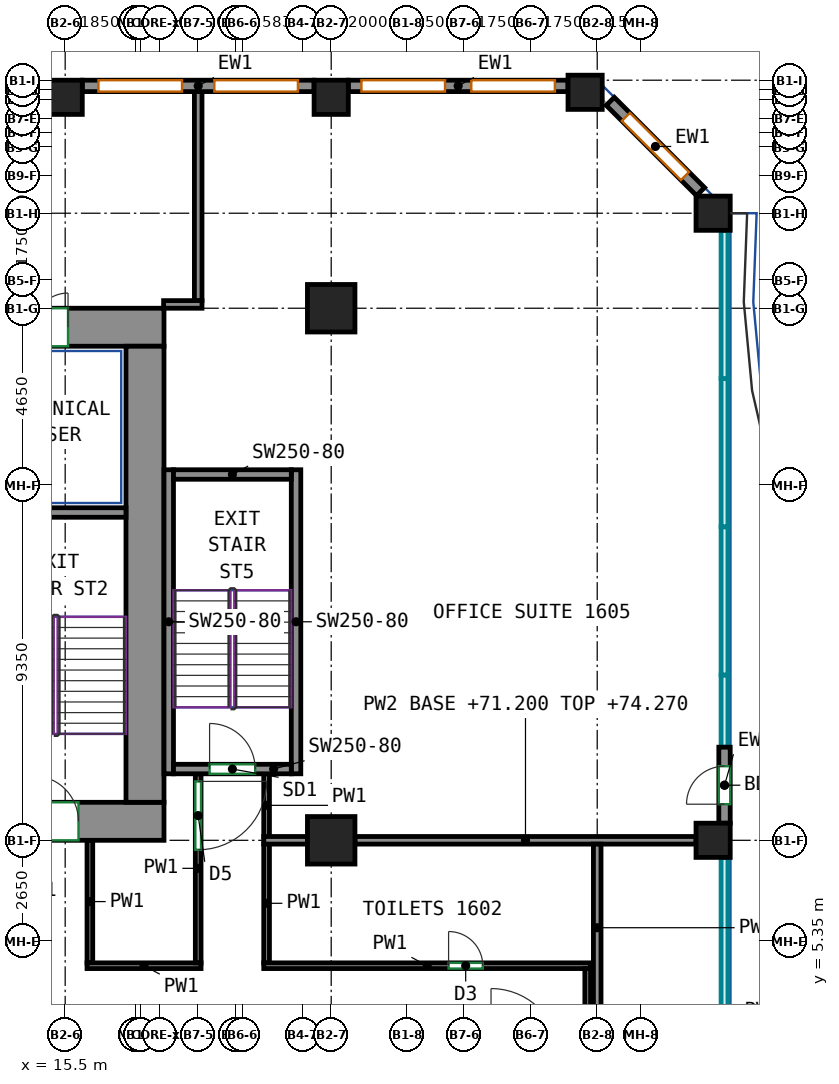
"""IFC4 building model, lengths in metres.
Left out: names, types, materials, properties, quantities, classifications, styles, units other than length and angle.
Written with IfcOpenShell. Run it as: python <this file> out.ifc"""

import sys

from ifc_helpers import new_model, si_unit, direction, frame, frame_2d, origin, origin_2d, place, context, subcontext, project, spatial, rectangle, extrude, source, transform, mapped, element, fill, save


model = new_model("IFC4")
c1 = context("Model", 3, precision=1e-05, world=origin(), true_north=direction((0.0, 1.0)))
c2 = subcontext(c1, "Body", "Model", "MODEL_VIEW")
j1 = project(units=[si_unit("LENGTHUNIT", "METRE"), si_unit("PLANEANGLEUNIT", "RADIAN")], contexts=[c1])
p1 = place(None, origin())
s1 = spatial("IfcSite", under=j1, at=p1, CompositionType="ELEMENT")
p2 = place(p1, origin())
s2 = spatial("IfcBuilding", under=s1, at=p2, CompositionType="ELEMENT")
p3 = place(p2, frame((0.0, 0.0, 71.2)))
s3 = spatial("IfcBuildingStorey", under=s2, at=p3, CompositionType="ELEMENT", Elevation=71.2)
m1 = source(origin(), c2, "Body", "SweptSolid", [
    extrude(rectangle(XDim=0.9, YDim=0.9, at=origin_2d()), origin(), (0.0, 0.0, 1.0), 3.72),
])
p4 = place(p3, frame((15.5, 27.55, 0.0), z_axis=(0.0, 0.0, 1.0), x_axis=(1.0, 0.0, 0.0)))
e1 = element("IfcColumn", 1, at=p4, inside=s3, PredefinedType="COLUMN", context=c2, shape_type="MappedRepresentation", body=[
    mapped(m1, transform((0.0, 0.0, 0.0))),
])
m2 = source(origin(), c2, "Body", "SweptSolid", [
    extrude(rectangle(XDim=1.25, YDim=1.25, at=origin_2d()), origin(), (0.0, 0.0, 1.0), 3.72),
])
for number, where, z_axis, x_axis in (
    (2, (22.5, 8.0, 0.0), (0.0, 0.0, 1.0), (1.0, 0.0, 0.0)),
    (3, (22.5, 22.0, 0.0), (0.0, 0.0, 1.0), (1.0, 0.0, 0.0)),
):
    element("IfcColumn", number, at=place(p3, frame(where, z_axis=z_axis, x_axis=x_axis)), inside=s3, PredefinedType="COLUMN", context=c2, shape_type="MappedRepresentation", body=[
        mapped(m2, transform((0.0, 0.0, 0.0))),
    ])
for number, where, z_axis, x_axis in (
    (4, (22.5, 27.55, 0.0), (0.0, 0.0, 1.0), (1.0, 0.0, 0.0)),
    (5, (29.182, 27.682, 0.0), (0.0, 0.0, 1.0), (1.0, 0.0, 0.0)),
    (6, (32.55, 8.0, 0.0), (0.0, 0.0, 1.0), (1.0, 0.0, 0.0)),
    (7, (32.55, 24.5, 0.0), (0.0, 0.0, 1.0), (1.0, 0.0, 0.0)),
):
    element("IfcColumn", number, at=place(p3, frame(where, z_axis=z_axis, x_axis=x_axis)), inside=s3, PredefinedType="COLUMN", context=c2, shape_type="MappedRepresentation", body=[
        mapped(m1, transform((0.0, 0.0, 0.0))),
    ])
m3 = source(origin(), c2, "Body", "SweptSolid", [
    extrude(rectangle(XDim=5.63, YDim=1.0, at=frame_2d((2.815, 0.0))), origin(), (0.0, 0.0, 1.0), 3.72),
])
p5 = place(p3, frame((12.47, 8.5, 0.0), z_axis=(0.0, 0.0, 1.0), x_axis=(1.0, 0.0, 0.0)))
e8 = element("IfcWall", 8, at=p5, inside=s3, PredefinedType="SHEAR", context=c2, shape_type="MappedRepresentation", body=[
    mapped(m3, transform((0.0, 0.0, 0.0))),
])
p6 = place(p5, frame((2.18, 0.0, 0.0)))
e9 = element("IfcOpeningElement", 9, at=p6, cuts=e8, PredefinedType="OPENING", context=c2, shape_type="SweptSolid", body=[
    extrude(rectangle(XDim=1.2, YDim=2.1, at=frame_2d((0.6, 1.05))), frame((0.0, 0.51, 0.0), z_axis=(0.0, -1.0, 0.0), x_axis=(1.0, 0.0, 0.0)), (0.0, 0.0, 1.0), 1.02),
])
m4 = source(origin(), c2, "Body", "SweptSolid", [
    extrude(rectangle(XDim=34.1, YDim=1.0, at=frame_2d((17.05, 0.0))), origin(), (0.0, 0.0, 1.0), 3.72),
])
p7 = place(p3, frame((-16.0, 21.5, 0.0), z_axis=(0.0, 0.0, 1.0), x_axis=(1.0, 0.0, 0.0)))
e10 = element("IfcWall", 10, at=p7, inside=s3, PredefinedType="SHEAR", context=c2, shape_type="MappedRepresentation", body=[
    mapped(m4, transform((0.0, 0.0, 0.0))),
])
p8 = place(p7, frame((6.831, 0.0, 0.0)))
e11 = element("IfcOpeningElement", 11, at=p8, cuts=e10, PredefinedType="OPENING", context=c2, shape_type="SweptSolid", body=[
    extrude(rectangle(XDim=0.9, YDim=2.1, at=frame_2d((0.45, 1.05))), frame((0.0, 0.51, 0.0), z_axis=(0.0, -1.0, 0.0), x_axis=(1.0, 0.0, 0.0)), (0.0, 0.0, 1.0), 1.02),
])
p9 = place(p7, frame((12.138, 0.0, 0.0)))
e12 = element("IfcOpeningElement", 12, at=p9, cuts=e10, PredefinedType="OPENING", context=c2, shape_type="SweptSolid", body=[
    extrude(rectangle(XDim=0.9, YDim=2.1, at=frame_2d((0.45, 1.05))), frame((0.0, 0.51, 0.0), z_axis=(0.0, -1.0, 0.0), x_axis=(1.0, 0.0, 0.0)), (0.0, 0.0, 1.0), 1.02),
])
p10 = place(p7, frame((17.565, 0.0, 0.0)))
e13 = element("IfcOpeningElement", 13, at=p10, cuts=e10, PredefinedType="OPENING", context=c2, shape_type="SweptSolid", body=[
    extrude(rectangle(XDim=0.9, YDim=2.1, at=frame_2d((0.45, 1.05))), frame((0.0, 0.51, 0.0), z_axis=(0.0, -1.0, 0.0), x_axis=(1.0, 0.0, 0.0)), (0.0, 0.0, 1.0), 1.02),
])
p11 = place(p7, frame((21.786, 0.0, 0.0)))
e14 = element("IfcOpeningElement", 14, at=p11, cuts=e10, PredefinedType="OPENING", context=c2, shape_type="SweptSolid", body=[
    extrude(rectangle(XDim=0.9, YDim=2.1, at=frame_2d((0.45, 1.05))), frame((0.0, 0.51, 0.0), z_axis=(0.0, -1.0, 0.0), x_axis=(1.0, 0.0, 0.0)), (0.0, 0.0, 1.0), 1.02),
])
p12 = place(p7, frame((26.127, 0.0, 0.0)))
e15 = element("IfcOpeningElement", 15, at=p12, cuts=e10, PredefinedType="OPENING", context=c2, shape_type="SweptSolid", body=[
    extrude(rectangle(XDim=0.9, YDim=2.1, at=frame_2d((0.45, 1.05))), frame((0.0, 0.51, 0.0), z_axis=(0.0, -1.0, 0.0), x_axis=(1.0, 0.0, 0.0)), (0.0, 0.0, 1.0), 1.02),
])
p13 = place(p7, frame((2.525, 0.0, 0.0)))
e16 = element("IfcOpeningElement", 16, at=p13, cuts=e10, PredefinedType="OPENING", context=c2, shape_type="SweptSolid", body=[
    extrude(rectangle(XDim=0.9, YDim=2.1, at=frame_2d((0.45, 1.05))), frame((0.0, 0.51, 0.0), z_axis=(0.0, -1.0, 0.0), x_axis=(1.0, 0.0, 0.0)), (0.0, 0.0, 1.0), 1.02),
])
p14 = place(p7, frame((30.675, 0.0, 0.0)))
e17 = element("IfcOpeningElement", 17, at=p14, cuts=e10, PredefinedType="OPENING", context=c2, shape_type="SweptSolid", body=[
    extrude(rectangle(XDim=0.9, YDim=2.1, at=frame_2d((0.45, 1.05))), frame((0.0, 0.51, 0.0), z_axis=(0.0, -1.0, 0.0), x_axis=(1.0, 0.0, 0.0)), (0.0, 0.0, 1.0), 1.02),
])
m5 = source(origin(), c2, "Body", "SweptSolid", [
    extrude(rectangle(XDim=12.0, YDim=1.0, at=frame_2d((6.0, 0.0))), origin(), (0.0, 0.0, 1.0), 3.72),
])
p15 = place(p3, frame((17.6, 9.0, 0.0), z_axis=(0.0, 0.0, 1.0), x_axis=(0.0, 1.0, 0.0)))
e18 = element("IfcWall", 18, at=p15, inside=s3, PredefinedType="SHEAR", context=c2, shape_type="MappedRepresentation", body=[
    mapped(m5, transform((0.0, 0.0, 0.0))),
])
m6 = source(origin(), c2, "Body", "SweptSolid", [
    extrude(rectangle(XDim=3.7, YDim=0.25, at=frame_2d((1.85, 0.0))), origin(), (0.0, 0.0, 1.0), 3.72),
])
p16 = place(p3, frame((13.4, 16.625, 0.0), z_axis=(0.0, 0.0, 1.0), x_axis=(1.0, 0.0, 0.0)))
e19 = element("IfcWall", 19, at=p16, inside=s3, PredefinedType="SHEAR", context=c2, shape_type="MappedRepresentation", body=[
    mapped(m6, transform((0.0, 0.0, 0.0))),
])
m7 = source(origin(), c2, "Body", "SweptSolid", [
    extrude(rectangle(XDim=8.0, YDim=0.25, at=frame_2d((4.0, 0.0))), origin(), (0.0, 0.0, 1.0), 3.72),
])
for number, where, z_axis, x_axis in (
    (20, (18.225, 9.75, 0.0), (0.0, 0.0, 1.0), (0.0, 1.0, 0.0)),
    (21, (21.575, 9.75, 0.0), (0.0, 0.0, 1.0), (0.0, 1.0, 0.0)),
):
    element("IfcWall", number, at=place(p3, frame(where, z_axis=z_axis, x_axis=x_axis)), inside=s3, PredefinedType="SHEAR", context=c2, shape_type="MappedRepresentation", body=[
        mapped(m7, transform((0.0, 0.0, 0.0))),
    ])
m8 = source(origin(), c2, "Body", "SweptSolid", [
    extrude(rectangle(XDim=3.1, YDim=0.25, at=frame_2d((1.55, 0.0))), origin(), (0.0, 0.0, 1.0), 3.72),
])
p17 = place(p3, frame((18.35, 9.875, 0.0), z_axis=(0.0, 0.0, 1.0), x_axis=(1.0, 0.0, 0.0)))
e22 = element("IfcWall", 22, at=p17, inside=s3, PredefinedType="SHEAR", context=c2, shape_type="MappedRepresentation", body=[
    mapped(m8, transform((0.0, 0.0, 0.0))),
])
p18 = place(p17, frame((0.95, 0.0, 0.0)))
e23 = element("IfcOpeningElement", 23, at=p18, cuts=e22, PredefinedType="OPENING", context=c2, shape_type="SweptSolid", body=[
    extrude(rectangle(XDim=1.2, YDim=2.1, at=frame_2d((0.6, 1.05))), frame((0.0, 0.135, 0.0), z_axis=(0.0, -1.0, 0.0), x_axis=(1.0, 0.0, 0.0)), (0.0, 0.0, 1.0), 0.27),
])
p19 = place(p3, frame((18.35, 17.625, 0.0), z_axis=(0.0, 0.0, 1.0), x_axis=(1.0, 0.0, 0.0)))
e24 = element("IfcWall", 24, at=p19, inside=s3, PredefinedType="SHEAR", context=c2, shape_type="MappedRepresentation", body=[
    mapped(m8, transform((0.0, 0.0, 0.0))),
])
m9 = source(origin(), c2, "Body", "SweptSolid", [
    extrude(rectangle(XDim=2.0, YDim=0.3, at=frame_2d((1.0, 0.0))), origin(), (0.0, 0.0, 1.0), 3.72),
])
p20 = place(p3, frame((32.85, 8.45, 0.0), z_axis=(0.0, 0.0, 1.0), x_axis=(0.0, 1.0, 0.0)))
e25 = element("IfcWall", 25, at=p20, inside=s3, PredefinedType="SOLIDWALL", context=c2, shape_type="MappedRepresentation", body=[
    mapped(m9, transform((0.0, 0.0, 0.0))),
])
p21 = place(p20, frame((0.5, 0.0, 0.0)))
e26 = element("IfcOpeningElement", 26, at=p21, cuts=e25, PredefinedType="OPENING", context=c2, shape_type="SweptSolid", body=[
    extrude(rectangle(XDim=1.0, YDim=2.1, at=frame_2d((0.5, 1.05))), frame((0.0, 0.16, 0.0), z_axis=(0.0, -1.0, 0.0), x_axis=(1.0, 0.0, 0.0)), (0.0, 0.0, 1.0), 0.32),
])
m10 = source(origin(), c2, "Body", "SweptSolid", [
    extrude(rectangle(XDim=3.359, YDim=0.3, at=frame_2d((1.679, 0.0))), origin(), (0.0, 0.0, 1.0), 3.72),
])
p22 = place(p3, frame((32.219, 25.069, 0.0), z_axis=(0.0, 0.0, 1.0), x_axis=(-0.707070438228, 0.707143122278, 0.0)))
e27 = element("IfcWall", 27, at=p22, inside=s3, PredefinedType="SOLIDWALL", context=c2, shape_type="MappedRepresentation", body=[
    mapped(m10, transform((0.0, 0.0, 0.0))),
])
p23 = place(p22, frame((0.579, 0.0, 0.7)))
e28 = element("IfcOpeningElement", 28, at=p23, cuts=e27, PredefinedType="OPENING", context=c2, shape_type="SweptSolid", body=[
    extrude(rectangle(XDim=2.2, YDim=2.25, at=frame_2d((1.1, 1.125))), frame((0.0, 0.16, 0.0), z_axis=(0.0, -1.0, 0.0), x_axis=(1.0, 0.0, 0.0)), (0.0, 0.0, 1.0), 0.32),
])
m11 = source(origin(), c2, "Body", "SweptSolid", [
    extrude(rectangle(XDim=5.782, YDim=0.3, at=frame_2d((2.891, 0.0))), origin(), (0.0, 0.0, 1.0), 3.72),
])
p24 = place(p3, frame((28.732, 27.85, 0.0), z_axis=(0.0, 0.0, 1.0), x_axis=(-1.0, 0.0, 0.0)))
e29 = element("IfcWall", 29, at=p24, inside=s3, PredefinedType="SOLIDWALL", context=c2, shape_type="MappedRepresentation", body=[
    mapped(m11, transform((0.0, 0.0, 0.0))),
])
p25 = place(p24, frame((0.345, 0.0, 0.7)))
e30 = element("IfcOpeningElement", 30, at=p25, cuts=e29, PredefinedType="OPENING", context=c2, shape_type="SweptSolid", body=[
    extrude(rectangle(XDim=2.2, YDim=2.25, at=frame_2d((1.1, 1.125))), frame((0.0, 0.16, 0.0), z_axis=(0.0, -1.0, 0.0), x_axis=(1.0, 0.0, 0.0)), (0.0, 0.0, 1.0), 0.32),
])
p26 = place(p24, frame((3.236, 0.0, 0.7)))
e31 = element("IfcOpeningElement", 31, at=p26, cuts=e29, PredefinedType="OPENING", context=c2, shape_type="SweptSolid", body=[
    extrude(rectangle(XDim=2.2, YDim=2.25, at=frame_2d((1.1, 1.125))), frame((0.0, 0.16, 0.0), z_axis=(0.0, -1.0, 0.0), x_axis=(1.0, 0.0, 0.0)), (0.0, 0.0, 1.0), 0.32),
])
m12 = source(origin(), c2, "Body", "SweptSolid", [
    extrude(rectangle(XDim=6.1, YDim=0.3, at=frame_2d((3.05, 0.0))), origin(), (0.0, 0.0, 1.0), 3.72),
])
p27 = place(p3, frame((22.05, 27.85, 0.0), z_axis=(0.0, 0.0, 1.0), x_axis=(-1.0, 0.0, 0.0)))
e32 = element("IfcWall", 32, at=p27, inside=s3, PredefinedType="SOLIDWALL", context=c2, shape_type="MappedRepresentation", body=[
    mapped(m12, transform((0.0, 0.0, 0.0))),
])
p28 = place(p27, frame((0.425, 0.0, 0.7)))
e33 = element("IfcOpeningElement", 33, at=p28, cuts=e32, PredefinedType="OPENING", context=c2, shape_type="SweptSolid", body=[
    extrude(rectangle(XDim=2.2, YDim=2.25, at=frame_2d((1.1, 1.125))), frame((0.0, 0.16, 0.0), z_axis=(0.0, -1.0, 0.0), x_axis=(1.0, 0.0, 0.0)), (0.0, 0.0, 1.0), 0.32),
])
p29 = place(p27, frame((3.475, 0.0, 0.7)))
e34 = element("IfcOpeningElement", 34, at=p29, cuts=e32, PredefinedType="OPENING", context=c2, shape_type="SweptSolid", body=[
    extrude(rectangle(XDim=2.2, YDim=2.25, at=frame_2d((1.1, 1.125))), frame((0.0, 0.16, 0.0), z_axis=(0.0, -1.0, 0.0), x_axis=(1.0, 0.0, 0.0)), (0.0, 0.0, 1.0), 0.32),
])
p30 = place(p3, frame((16.15, 4.775, 0.0), z_axis=(0.0, 0.0, 1.0), x_axis=(0.0, 1.0, 0.0)))
e35 = element("IfcWall", 35, at=p30, inside=s3, PredefinedType="PARTITIONING", context=c2, shape_type="SweptSolid", body=[
    extrude(rectangle(XDim=3.225, YDim=0.15, at=frame_2d((1.613, 0.0))), origin(), (0.0, 0.0, 1.0), 3.72),
])
p31 = place(p3, frame((16.075, 4.7, 0.0), z_axis=(0.0, 0.0, 1.0), x_axis=(1.0, 0.0, 0.0)))
e36 = element("IfcWall", 36, at=p31, inside=s3, PredefinedType="PARTITIONING", context=c2, shape_type="SweptSolid", body=[
    extrude(rectangle(XDim=3.0, YDim=0.15, at=frame_2d((1.5, 0.0))), origin(), (0.0, 0.0, 1.0), 3.72),
])
p32 = place(p3, frame((19.0, 9.75, 0.0), z_axis=(0.0, 0.0, 1.0), x_axis=(0.0, -1.0, 0.0)))
e37 = element("IfcWall", 37, at=p32, inside=s3, PredefinedType="PARTITIONING", context=c2, shape_type="SweptSolid", body=[
    extrude(rectangle(XDim=4.975, YDim=0.15, at=frame_2d((2.488, 0.0))), origin(), (0.0, 0.0, 1.0), 3.72),
])
p33 = place(p32, frame((0.2, 0.0, 0.0)))
e38 = element("IfcOpeningElement", 38, at=p33, cuts=e37, PredefinedType="OPENING", context=c2, shape_type="SweptSolid", body=[
    extrude(rectangle(XDim=1.8, YDim=2.1, at=frame_2d((0.9, 1.05))), frame((0.0, 0.085, 0.0), z_axis=(0.0, -1.0, 0.0), x_axis=(1.0, 0.0, 0.0)), (0.0, 0.0, 1.0), 0.17),
])
p34 = place(p3, frame((20.8, 8.09, 0.0), z_axis=(0.0, 0.0, 1.0), x_axis=(0.0, 1.0, 0.0)))
e39 = element("IfcWall", 39, at=p34, inside=s3, PredefinedType="PARTITIONING", context=c2, shape_type="SweptSolid", body=[
    extrude(rectangle(XDim=1.66, YDim=0.15, at=frame_2d((0.83, 0.0))), origin(), (0.0, 0.0, 1.0), 3.72),
])
p35 = place(p3, frame((20.8, 4.775, 0.0), z_axis=(0.0, 0.0, 1.0), x_axis=(0.0, 1.0, 0.0)))
e40 = element("IfcWall", 40, at=p35, inside=s3, PredefinedType="PARTITIONING", context=c2, shape_type="SweptSolid", body=[
    extrude(rectangle(XDim=3.135, YDim=0.15, at=frame_2d((1.567, 0.0))), origin(), (0.0, 0.0, 1.0), 3.72),
])
p36 = place(p3, frame((20.725, 4.7, 0.0), z_axis=(0.0, 0.0, 1.0), x_axis=(1.0, 0.0, 0.0)))
e41 = element("IfcWall", 41, at=p36, inside=s3, PredefinedType="PARTITIONING", context=c2, shape_type="SweptSolid", body=[
    extrude(rectangle(XDim=8.6, YDim=0.15, at=frame_2d((4.3, 0.0))), origin(), (0.0, 0.0, 1.0), 3.72),
])
p37 = place(p36, frame((4.864, 0.0, 0.0)))
e42 = element("IfcOpeningElement", 42, at=p37, cuts=e41, PredefinedType="OPENING", context=c2, shape_type="SweptSolid", body=[
    extrude(rectangle(XDim=0.9, YDim=2.1, at=frame_2d((0.45, 1.05))), frame((0.0, 0.085, 0.0), z_axis=(0.0, -1.0, 0.0), x_axis=(1.0, 0.0, 0.0)), (0.0, 0.0, 1.0), 0.17),
])
p38 = place(p3, frame((29.25, 2.375, 0.0), z_axis=(0.0, 0.0, 1.0), x_axis=(0.0, 1.0, 0.0)))
e43 = element("IfcWall", 43, at=p38, inside=s3, PredefinedType="PARTITIONING", context=c2, shape_type="SweptSolid", body=[
    extrude(rectangle(XDim=2.25, YDim=0.15, at=frame_2d((1.125, 0.0))), origin(), (0.0, 0.0, 1.0), 3.07),
])
p39 = place(p3, frame((19.0, 22.2, 0.0), z_axis=(0.0, 0.0, 1.0), x_axis=(0.0, 1.0, 0.0)))
e44 = element("IfcWall", 44, at=p39, inside=s3, PredefinedType="PARTITIONING", context=c2, shape_type="SweptSolid", body=[
    extrude(rectangle(XDim=5.55, YDim=0.2, at=frame_2d((2.775, 0.0))), origin(), (0.0, 0.0, 1.0), 3.72),
])
p40 = place(p3, frame((18.09, 22.1, 0.0), z_axis=(0.0, 0.0, 1.0), x_axis=(1.0, 0.0, 0.0)))
e45 = element("IfcWall", 45, at=p40, inside=s3, PredefinedType="PARTITIONING", context=c2, shape_type="SweptSolid", body=[
    extrude(rectangle(XDim=1.01, YDim=0.2, at=frame_2d((0.505, 0.0))), origin(), (0.0, 0.0, 1.0), 3.72),
])
p41 = place(p3, frame((23.125, 8.0, 0.0), z_axis=(0.0, 0.0, 1.0), x_axis=(1.0, 0.0, 0.0)))
e46 = element("IfcWall", 46, at=p41, inside=s3, PredefinedType="PARTITIONING", context=c2, shape_type="SweptSolid", body=[
    extrude(rectangle(XDim=8.975, YDim=0.2, at=frame_2d((4.488, 0.0))), origin(), (0.0, 0.0, 1.0), 3.07),
])
p42 = place(p3, frame((20.726, 8.0, 0.0), z_axis=(0.0, 0.0, 1.0), x_axis=(1.0, 0.0, 0.0)))
e47 = element("IfcWall", 47, at=p42, inside=s3, PredefinedType="PARTITIONING", context=c2, shape_type="SweptSolid", body=[
    extrude(rectangle(XDim=1.149, YDim=0.2, at=frame_2d((0.574, 0.0))), origin(), (0.0, 0.0, 1.0), 3.72),
])
p43 = place(p3, frame((29.5, 3.5, 0.0), z_axis=(0.0, 0.0, 1.0), x_axis=(0.0, 1.0, 0.0)))
e48 = element("IfcWall", 48, at=p43, inside=s3, PredefinedType="PARTITIONING", context=c2, shape_type="SweptSolid", body=[
    extrude(rectangle(XDim=4.4, YDim=0.2, at=frame_2d((2.2, 0.0))), origin(), (0.0, 0.0, 1.0), 3.07),
])
p44 = place(p21, origin())
e49 = element("IfcDoor", 49, at=p44, inside=s3, OperationType="SINGLE_SWING_LEFT", PredefinedType="DOOR", context=c2, shape_type="SweptSolid", body=[
    extrude(rectangle(XDim=1.0, YDim=2.1, at=frame_2d((0.5, 1.05))), frame((0.0, 0.025, 0.0), z_axis=(0.0, -1.0, 0.0), x_axis=(1.0, 0.0, 0.0)), (0.0, 0.0, 1.0), 0.05),
])
fill(e26, e49)
p45 = place(p23, origin())
e50 = element("IfcWindow", 50, at=p45, inside=s3, PartitioningType="SINGLE_PANEL", PredefinedType="WINDOW", context=c2, shape_type="SweptSolid", body=[
    extrude(rectangle(XDim=2.2, YDim=2.25, at=frame_2d((1.1, 1.125))), frame((0.0, 0.03, 0.0), z_axis=(0.0, -1.0, 0.0), x_axis=(1.0, 0.0, 0.0)), (0.0, 0.0, 1.0), 0.06),
])
fill(e28, e50)
p46 = place(p25, origin())
e51 = element("IfcWindow", 51, at=p46, inside=s3, PartitioningType="SINGLE_PANEL", PredefinedType="WINDOW", context=c2, shape_type="SweptSolid", body=[
    extrude(rectangle(XDim=2.2, YDim=2.25, at=frame_2d((1.1, 1.125))), frame((0.0, 0.03, 0.0), z_axis=(0.0, -1.0, 0.0), x_axis=(1.0, 0.0, 0.0)), (0.0, 0.0, 1.0), 0.06),
])
fill(e30, e51)
p47 = place(p26, origin())
e52 = element("IfcWindow", 52, at=p47, inside=s3, PartitioningType="SINGLE_PANEL", PredefinedType="WINDOW", context=c2, shape_type="SweptSolid", body=[
    extrude(rectangle(XDim=2.2, YDim=2.25, at=frame_2d((1.1, 1.125))), frame((0.0, 0.03, 0.0), z_axis=(0.0, -1.0, 0.0), x_axis=(1.0, 0.0, 0.0)), (0.0, 0.0, 1.0), 0.06),
])
fill(e31, e52)
p48 = place(p28, origin())
e53 = element("IfcWindow", 53, at=p48, inside=s3, PartitioningType="SINGLE_PANEL", PredefinedType="WINDOW", context=c2, shape_type="SweptSolid", body=[
    extrude(rectangle(XDim=2.2, YDim=2.25, at=frame_2d((1.1, 1.125))), frame((0.0, 0.03, 0.0), z_axis=(0.0, -1.0, 0.0), x_axis=(1.0, 0.0, 0.0)), (0.0, 0.0, 1.0), 0.06),
])
fill(e33, e53)
p49 = place(p29, origin())
e54 = element("IfcWindow", 54, at=p49, inside=s3, PartitioningType="SINGLE_PANEL", PredefinedType="WINDOW", context=c2, shape_type="SweptSolid", body=[
    extrude(rectangle(XDim=2.2, YDim=2.25, at=frame_2d((1.1, 1.125))), frame((0.0, 0.03, 0.0), z_axis=(0.0, -1.0, 0.0), x_axis=(1.0, 0.0, 0.0)), (0.0, 0.0, 1.0), 0.06),
])
fill(e34, e54)
p50 = place(p14, origin())
e55 = element("IfcDoor", 55, at=p50, inside=s3, OperationType="SINGLE_SWING_RIGHT", PredefinedType="DOOR", context=c2, shape_type="SweptSolid", body=[
    extrude(rectangle(XDim=0.9, YDim=2.1, at=frame_2d((0.45, 1.05))), frame((0.0, -0.355, 0.0), z_axis=(0.0, -1.0, 0.0), x_axis=(1.0, 0.0, 0.0)), (0.0, 0.0, 1.0), 0.05),
])
fill(e17, e55)
p51 = place(p6, origin())
e56 = element("IfcDoor", 56, at=p51, inside=s3, OperationType="DOUBLE_DOOR_SINGLE_SWING", PredefinedType="DOOR", context=c2, shape_type="SweptSolid", body=[
    extrude(rectangle(XDim=1.2, YDim=2.1, at=frame_2d((0.6, 1.05))), frame((0.0, 0.405, 0.0), z_axis=(0.0, -1.0, 0.0), x_axis=(1.0, 0.0, 0.0)), (0.0, 0.0, 1.0), 0.05),
])
fill(e9, e56)
p52 = place(p18, origin())
e57 = element("IfcDoor", 57, at=p52, inside=s3, OperationType="DOUBLE_DOOR_SINGLE_SWING", PredefinedType="DOOR", context=c2, shape_type="SweptSolid", body=[
    extrude(rectangle(XDim=1.2, YDim=2.1, at=frame_2d((0.6, 1.05))), frame((0.0, 0.025, 0.0), z_axis=(0.0, -1.0, 0.0), x_axis=(1.0, 0.0, 0.0)), (0.0, 0.0, 1.0), 0.05),
])
fill(e23, e57)
p53 = place(p37, origin())
e58 = element("IfcDoor", 58, at=p53, inside=s3, OperationType="SINGLE_SWING_LEFT", PredefinedType="DOOR", context=c2, shape_type="SweptSolid", body=[
    extrude(rectangle(XDim=0.9, YDim=2.1, at=frame_2d((0.45, 1.05))), frame((0.0, 0.025, 0.0), z_axis=(0.0, -1.0, 0.0), x_axis=(1.0, 0.0, 0.0)), (0.0, 0.0, 1.0), 0.05),
])
fill(e42, e58)
p54 = place(p33, origin())
e59 = element("IfcDoor", 59, at=p54, inside=s3, OperationType="DOUBLE_DOOR_SINGLE_SWING", PredefinedType="DOOR", context=c2, shape_type="SweptSolid", body=[
    extrude(rectangle(XDim=1.8, YDim=2.1, at=frame_2d((0.9, 1.05))), frame((0.0, 0.025, 0.0), z_axis=(0.0, -1.0, 0.0), x_axis=(1.0, 0.0, 0.0)), (0.0, 0.0, 1.0), 0.05),
])
fill(e38, e59)
save(model, sys.argv[1])
